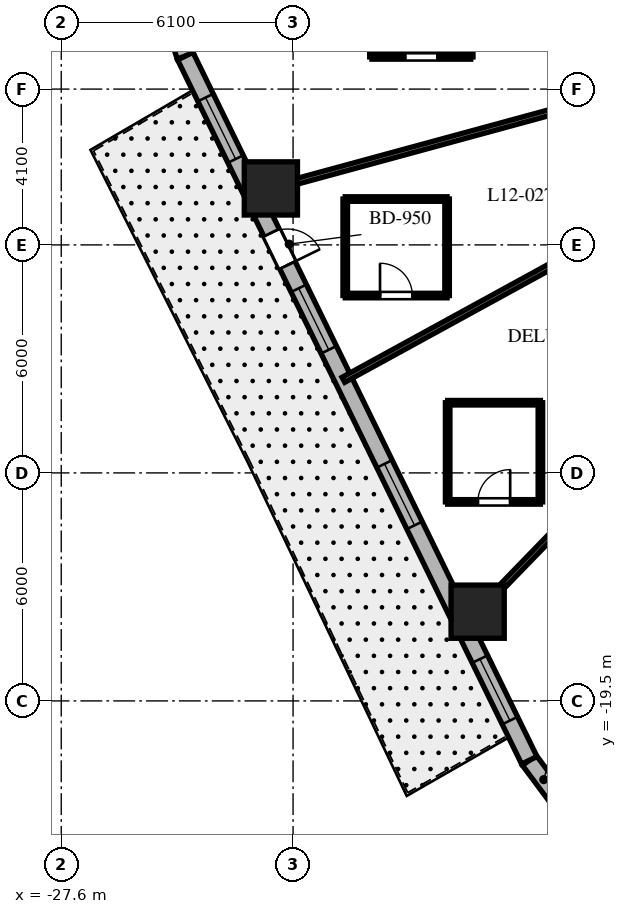
"""IFC4 building model, lengths in metres.
Left out: names, types, materials, properties, quantities, classifications, styles, units other than length and angle.
Written with IfcOpenShell. Run it as: python <this file> out.ifc"""

import sys

from ifc_helpers import new_model, si_unit, direction, frame, frame_2d, origin, origin_2d, place, context, subcontext, project, spatial, rectangle, extrude, element, fill, save


model = new_model("IFC4")
c1 = context("Model", 3, precision=1e-05, world=origin(), true_north=direction((0.0, 1.0)))
c2 = subcontext(c1, "Body", "Model", "MODEL_VIEW")
j1 = project(units=[si_unit("LENGTHUNIT", "METRE"), si_unit("PLANEANGLEUNIT", "RADIAN")], contexts=[c1])
p1 = place(None, origin())
s1 = spatial("IfcSite", under=j1, at=p1, CompositionType="ELEMENT")
p2 = place(p1, origin())
s2 = spatial("IfcBuilding", under=s1, at=p2, CompositionType="ELEMENT")
p3 = place(p2, frame((0.0, 0.0, 56.4)))
s3 = spatial("IfcBuildingStorey", under=s2, at=p3, CompositionType="ELEMENT", Elevation=56.4)
for number, where, z_axis, x_axis in (
    (1, (-22.084, -6.014, 0.0), (0.0, 0.0, 1.0), (1.0, 0.0, 0.0)),
    (2, (-16.643, -17.152, 0.0), (0.0, 0.0, 1.0), (1.0, 0.0, 0.0)),
):
    element("IfcColumn", number, at=place(p3, frame(where, z_axis=z_axis, x_axis=x_axis)), inside=s3, PredefinedType="COLUMN", context=c2, shape_type="SweptSolid", body=[
        extrude(rectangle(XDim=1.4, YDim=1.4, at=origin_2d()), origin(), (0.0, 0.0, 1.0), 3.7),
    ])
p4 = place(p3, frame((-15.284, -21.062, 0.0), z_axis=(0.0, 0.0, 1.0), x_axis=(0.597595366449, -0.801797841104, 0.0)))
e3 = element("IfcWall", 3, at=p4, inside=s3, PredefinedType="SOLIDWALL", context=c2, shape_type="SweptSolid", body=[
    extrude(rectangle(XDim=1.269, YDim=0.45, at=frame_2d((0.634, 0.0))), origin(), (0.0, 0.0, 1.0), 3.4),
])
p5 = place(p3, frame((-24.621, -1.682, 0.0), z_axis=(0.0, 0.0, 1.0), x_axis=(0.317697451681, -0.948192137278, 0.0)))
e4 = element("IfcWall", 4, at=p5, inside=s3, PredefinedType="SOLIDWALL", context=c2, shape_type="SweptSolid", body=[
    extrude(rectangle(XDim=0.897, YDim=0.45, at=frame_2d((0.448, 0.0))), origin(), (0.0, 0.0, 1.0), 3.4),
])
p6 = place(p3, frame((-24.336, -2.532, 0.0), z_axis=(0.0, 0.0, 1.0), x_axis=(0.438931326393, -0.898520612291, 0.0)))
e5 = element("IfcWall", 5, at=p6, inside=s3, PredefinedType="SOLIDWALL", context=c2, shape_type="SweptSolid", body=[
    extrude(rectangle(XDim=20.623, YDim=0.45, at=frame_2d((10.312, 0.0))), origin(), (0.0, 0.0, 1.0), 3.4),
])
p7 = place(p6, frame((5.171, 0.0, 0.0)))
e6 = element("IfcOpeningElement", 6, at=p7, cuts=e5, PredefinedType="OPENING", context=c2, shape_type="SweptSolid", body=[
    extrude(rectangle(XDim=0.95, YDim=2.15, at=frame_2d((0.475, 1.075))), frame((0.0, 0.235, 0.0), z_axis=(0.0, -1.0, 0.0), x_axis=(1.0, 0.0, 0.0)), (0.0, 0.0, 1.0), 0.47),
])
p8 = place(p6, frame((1.214, 0.0, 0.8)))
e7 = element("IfcOpeningElement", 7, at=p8, cuts=e5, PredefinedType="OPENING", context=c2, shape_type="SweptSolid", body=[
    extrude(rectangle(XDim=1.8, YDim=1.8, at=frame_2d((0.9, 0.9))), frame((0.0, 0.235, 0.0), z_axis=(0.0, -1.0, 0.0), x_axis=(1.0, 0.0, 0.0)), (0.0, 0.0, 1.0), 0.47),
])
p9 = place(p6, frame((6.8, 0.0, 0.8)))
e8 = element("IfcOpeningElement", 8, at=p9, cuts=e5, PredefinedType="OPENING", context=c2, shape_type="SweptSolid", body=[
    extrude(rectangle(XDim=1.8, YDim=1.8, at=frame_2d((0.9, 0.9))), frame((0.0, 0.235, 0.0), z_axis=(0.0, -1.0, 0.0), x_axis=(1.0, 0.0, 0.0)), (0.0, 0.0, 1.0), 0.47),
])
p10 = place(p6, frame((11.942, 0.0, 0.8)))
e9 = element("IfcOpeningElement", 9, at=p10, cuts=e5, PredefinedType="OPENING", context=c2, shape_type="SweptSolid", body=[
    extrude(rectangle(XDim=1.8, YDim=1.8, at=frame_2d((0.9, 0.9))), frame((0.0, 0.235, 0.0), z_axis=(0.0, -1.0, 0.0), x_axis=(1.0, 0.0, 0.0)), (0.0, 0.0, 1.0), 0.47),
])
p11 = place(p6, frame((17.66, 0.0, 0.8)))
e10 = element("IfcOpeningElement", 10, at=p11, cuts=e5, PredefinedType="OPENING", context=c2, shape_type="SweptSolid", body=[
    extrude(rectangle(XDim=1.8, YDim=1.8, at=frame_2d((0.9, 0.9))), frame((0.0, 0.235, 0.0), z_axis=(0.0, -1.0, 0.0), x_axis=(1.0, 0.0, 0.0)), (0.0, 0.0, 1.0), 0.47),
])
p12 = place(p3, frame((-11.35, -3.091, 0.0), z_axis=(0.0, 0.0, 1.0), x_axis=(-0.964859685283, -0.262765651704, 0.0)))
e11 = element("IfcWall", 11, at=p12, inside=s3, PredefinedType="PARTITIONING", context=c2, shape_type="SweptSolid", body=[
    extrude(rectangle(XDim=11.629, YDim=0.15, at=frame_2d((5.814, 0.0))), origin(), (0.0, 0.0, 1.0), 2.54),
])
p13 = place(p3, frame((-11.35, -6.217, 0.0), z_axis=(0.0, 0.0, 1.0), x_axis=(-0.877047587135, -0.480403507378, 0.0)))
e12 = element("IfcWall", 12, at=p13, inside=s3, PredefinedType="PARTITIONING", context=c2, shape_type="SweptSolid", body=[
    extrude(rectangle(XDim=10.062, YDim=0.15, at=frame_2d((5.031, 0.0))), origin(), (0.0, 0.0, 1.0), 2.54),
])
p14 = place(p3, frame((-9.558, -9.85, 0.0), z_axis=(0.0, 0.0, 1.0), x_axis=(-0.69638346089, -0.717669893056, 0.0)))
e13 = element("IfcWall", 13, at=p14, inside=s3, PredefinedType="PARTITIONING", context=c2, shape_type="SweptSolid", body=[
    extrude(rectangle(XDim=10.701, YDim=0.15, at=frame_2d((5.351, 0.0))), origin(), (0.0, 0.0, 1.0), 2.54),
])
p15 = place(p3, frame((-19.425, -2.553, 0.0), z_axis=(0.0, 0.0, 1.0), x_axis=(1.0, 0.0, 0.0)))
e14 = element("IfcWall", 14, at=p15, inside=s3, PredefinedType="PARTITIONING", context=c2, shape_type="SweptSolid", body=[
    extrude(rectangle(XDim=2.6, YDim=0.12, at=frame_2d((1.3, 0.0))), origin(), (0.0, 0.0, 1.0), 2.841),
])
p16 = place(p15, frame((0.875, 0.0, 0.0)))
e15 = element("IfcOpeningElement", 15, at=p16, cuts=e14, PredefinedType="OPENING", context=c2, shape_type="SweptSolid", body=[
    extrude(rectangle(XDim=0.85, YDim=2.03, at=frame_2d((0.425, 1.015))), frame((0.0, 0.07, 0.0), z_axis=(0.0, -1.0, 0.0), x_axis=(1.0, 0.0, 0.0)), (0.0, 0.0, 1.0), 0.14),
])
for number, where, z_axis, x_axis in (
    (16, (-16.825, -2.553, 0.0), (0.0, 0.0, 1.0), (0.0, 1.0, 0.0)),
    (17, (-19.425, 0.197, 0.0), (0.0, 0.0, 1.0), (0.0, -1.0, 0.0)),
):
    element("IfcWall", number, at=place(p3, frame(where, z_axis=z_axis, x_axis=x_axis)), inside=s3, PredefinedType="PARTITIONING", context=c2, shape_type="SweptSolid", body=[
        extrude(rectangle(XDim=2.75, YDim=0.12, at=frame_2d((1.375, 0.0))), origin(), (0.0, 0.0, 1.0), 3.4),
    ])
p17 = place(p3, frame((-20.127, -8.833, 0.0), z_axis=(0.0, 0.0, 1.0), x_axis=(1.0, 0.0, 0.0)))
e18 = element("IfcWall", 18, at=p17, inside=s3, PredefinedType="PARTITIONING", context=c2, shape_type="SweptSolid", body=[
    extrude(rectangle(XDim=2.68, YDim=0.12, at=frame_2d((1.34, 0.0))), origin(), (0.0, 0.0, 1.0), 3.4),
])
p18 = place(p17, frame((0.915, 0.0, 0.0)))
e19 = element("IfcOpeningElement", 19, at=p18, cuts=e18, PredefinedType="OPENING", context=c2, shape_type="SweptSolid", body=[
    extrude(rectangle(XDim=0.85, YDim=2.03, at=frame_2d((0.425, 1.015))), frame((0.0, 0.07, 0.0), z_axis=(0.0, -1.0, 0.0), x_axis=(1.0, 0.0, 0.0)), (0.0, 0.0, 1.0), 0.14),
])
p19 = place(p3, frame((-17.447, -8.833, 0.0), z_axis=(0.0, 0.0, 1.0), x_axis=(0.0, 1.0, 0.0)))
e20 = element("IfcWall", 20, at=p19, inside=s3, PredefinedType="PARTITIONING", context=c2, shape_type="SweptSolid", body=[
    extrude(rectangle(XDim=2.54, YDim=0.12, at=frame_2d((1.27, 0.0))), origin(), (0.0, 0.0, 1.0), 2.84),
])
p20 = place(p3, frame((-17.447, -6.293, 0.0), z_axis=(0.0, 0.0, 1.0), x_axis=(-1.0, 0.0, 0.0)))
e21 = element("IfcWall", 21, at=p20, inside=s3, PredefinedType="PARTITIONING", context=c2, shape_type="SweptSolid", body=[
    extrude(rectangle(XDim=2.68, YDim=0.12, at=frame_2d((1.34, 0.0))), origin(), (0.0, 0.0, 1.0), 2.84),
])
p21 = place(p3, frame((-20.127, -6.293, 0.0), z_axis=(0.0, 0.0, 1.0), x_axis=(0.0, -1.0, 0.0)))
e22 = element("IfcWall", 22, at=p21, inside=s3, PredefinedType="PARTITIONING", context=c2, shape_type="SweptSolid", body=[
    extrude(rectangle(XDim=2.54, YDim=0.12, at=frame_2d((1.27, 0.0))), origin(), (0.0, 0.0, 1.0), 2.84),
])
p22 = place(p3, frame((-17.432, -14.263, 0.0), z_axis=(0.0, 0.0, 1.0), x_axis=(1.0, 0.0, 0.0)))
e23 = element("IfcWall", 23, at=p22, inside=s3, PredefinedType="PARTITIONING", context=c2, shape_type="SweptSolid", body=[
    extrude(rectangle(XDim=2.44, YDim=0.12, at=frame_2d((1.22, 0.0))), origin(), (0.0, 0.0, 1.0), 3.4),
])
p23 = place(p22, frame((0.795, 0.0, 0.0)))
e24 = element("IfcOpeningElement", 24, at=p23, cuts=e23, PredefinedType="OPENING", context=c2, shape_type="SweptSolid", body=[
    extrude(rectangle(XDim=0.85, YDim=2.03, at=frame_2d((0.425, 1.015))), frame((0.0, 0.07, 0.0), z_axis=(0.0, -1.0, 0.0), x_axis=(1.0, 0.0, 0.0)), (0.0, 0.0, 1.0), 0.14),
])
p24 = place(p3, frame((-14.992, -14.263, 0.0), z_axis=(0.0, 0.0, 1.0), x_axis=(0.0, 1.0, 0.0)))
e25 = element("IfcWall", 25, at=p24, inside=s3, PredefinedType="PARTITIONING", context=c2, shape_type="SweptSolid", body=[
    extrude(rectangle(XDim=2.61, YDim=0.12, at=frame_2d((1.305, 0.0))), origin(), (0.0, 0.0, 1.0), 2.927),
])
p25 = place(p3, frame((-14.992, -11.653, 0.0), z_axis=(0.0, 0.0, 1.0), x_axis=(-1.0, 0.0, 0.0)))
e26 = element("IfcWall", 26, at=p25, inside=s3, PredefinedType="PARTITIONING", context=c2, shape_type="SweptSolid", body=[
    extrude(rectangle(XDim=2.44, YDim=0.12, at=frame_2d((1.22, 0.0))), origin(), (0.0, 0.0, 1.0), 2.927),
])
p26 = place(p3, frame((-17.432, -11.653, 0.0), z_axis=(0.0, 0.0, 1.0), x_axis=(0.0, -1.0, 0.0)))
e27 = element("IfcWall", 27, at=p26, inside=s3, PredefinedType="PARTITIONING", context=c2, shape_type="SweptSolid", body=[
    extrude(rectangle(XDim=2.61, YDim=0.12, at=frame_2d((1.305, 0.0))), origin(), (0.0, 0.0, 1.0), 3.4),
])
p27 = place(p7, origin())
e28 = element("IfcDoor", 28, at=p27, inside=s3, OperationType="SINGLE_SWING_RIGHT", PredefinedType="DOOR", context=c2, shape_type="SweptSolid", body=[
    extrude(rectangle(XDim=0.95, YDim=2.15, at=frame_2d((0.475, 1.075))), frame((0.0, 0.025, 0.0), z_axis=(0.0, -1.0, 0.0), x_axis=(1.0, 0.0, 0.0)), (0.0, 0.0, 1.0), 0.05),
])
fill(e6, e28)
p28 = place(p8, origin())
e29 = element("IfcWindow", 29, at=p28, inside=s3, PartitioningType="SINGLE_PANEL", PredefinedType="WINDOW", context=c2, shape_type="SweptSolid", body=[
    extrude(rectangle(XDim=1.8, YDim=1.8, at=frame_2d((0.9, 0.9))), frame((0.0, 0.03, 0.0), z_axis=(0.0, -1.0, 0.0), x_axis=(1.0, 0.0, 0.0)), (0.0, 0.0, 1.0), 0.06),
])
fill(e7, e29)
p29 = place(p9, origin())
e30 = element("IfcWindow", 30, at=p29, inside=s3, PartitioningType="SINGLE_PANEL", PredefinedType="WINDOW", context=c2, shape_type="SweptSolid", body=[
    extrude(rectangle(XDim=1.8, YDim=1.8, at=frame_2d((0.9, 0.9))), frame((0.0, 0.03, 0.0), z_axis=(0.0, -1.0, 0.0), x_axis=(1.0, 0.0, 0.0)), (0.0, 0.0, 1.0), 0.06),
])
fill(e8, e30)
p30 = place(p10, origin())
e31 = element("IfcWindow", 31, at=p30, inside=s3, PartitioningType="SINGLE_PANEL", PredefinedType="WINDOW", context=c2, shape_type="SweptSolid", body=[
    extrude(rectangle(XDim=1.8, YDim=1.8, at=frame_2d((0.9, 0.9))), frame((0.0, 0.03, 0.0), z_axis=(0.0, -1.0, 0.0), x_axis=(1.0, 0.0, 0.0)), (0.0, 0.0, 1.0), 0.06),
])
fill(e9, e31)
p31 = place(p11, origin())
e32 = element("IfcWindow", 32, at=p31, inside=s3, PartitioningType="SINGLE_PANEL", PredefinedType="WINDOW", context=c2, shape_type="SweptSolid", body=[
    extrude(rectangle(XDim=1.8, YDim=1.8, at=frame_2d((0.9, 0.9))), frame((0.0, 0.03, 0.0), z_axis=(0.0, -1.0, 0.0), x_axis=(1.0, 0.0, 0.0)), (0.0, 0.0, 1.0), 0.06),
])
fill(e10, e32)
p32 = place(p16, origin())
e33 = element("IfcDoor", 33, at=p32, inside=s3, OperationType="SINGLE_SWING_RIGHT", PredefinedType="DOOR", context=c2, shape_type="SweptSolid", body=[
    extrude(rectangle(XDim=0.85, YDim=2.03, at=frame_2d((0.425, 1.015))), frame((0.0, 0.025, 0.0), z_axis=(0.0, -1.0, 0.0), x_axis=(1.0, 0.0, 0.0)), (0.0, 0.0, 1.0), 0.05),
])
fill(e15, e33)
p33 = place(p18, origin())
e34 = element("IfcDoor", 34, at=p33, inside=s3, OperationType="SINGLE_SWING_LEFT", PredefinedType="DOOR", context=c2, shape_type="SweptSolid", body=[
    extrude(rectangle(XDim=0.85, YDim=2.03, at=frame_2d((0.425, 1.015))), frame((0.0, 0.025, 0.0), z_axis=(0.0, -1.0, 0.0), x_axis=(1.0, 0.0, 0.0)), (0.0, 0.0, 1.0), 0.05),
])
fill(e19, e34)
p34 = place(p23, origin())
e35 = element("IfcDoor", 35, at=p34, inside=s3, OperationType="SINGLE_SWING_RIGHT", PredefinedType="DOOR", context=c2, shape_type="SweptSolid", body=[
    extrude(rectangle(XDim=0.85, YDim=2.03, at=frame_2d((0.425, 1.015))), frame((0.0, 0.025, 0.0), z_axis=(0.0, -1.0, 0.0), x_axis=(1.0, 0.0, 0.0)), (0.0, 0.0, 1.0), 0.05),
])
fill(e24, e35)
save(model, sys.argv[1])
